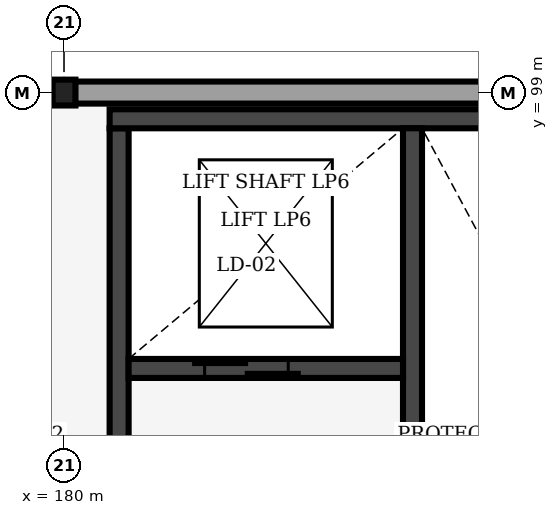
"""IFC4 building model, lengths in metres.
Left out: names, types, materials, properties, quantities, classifications, styles, units other than length and angle.
Written with IfcOpenShell. Run it as: python <this file> out.ifc"""

import sys

from ifc_helpers import new_model, si_unit, direction, frame, frame_2d, origin, origin_2d, place, context, subcontext, project, spatial, rectangle, i_section, extrude, element, fill, save


model = new_model("IFC4")
c1 = context("Model", 3, precision=1e-05, world=origin(), true_north=direction((0.0, 1.0)))
c2 = subcontext(c1, "Body", "Model", "MODEL_VIEW")
j1 = project(units=[si_unit("LENGTHUNIT", "METRE"), si_unit("PLANEANGLEUNIT", "RADIAN")], contexts=[c1])
p1 = place(None, origin())
s1 = spatial("IfcSite", under=j1, at=p1, CompositionType="ELEMENT")
p2 = place(p1, origin())
s2 = spatial("IfcBuilding", under=s1, at=p2, CompositionType="ELEMENT")
p3 = place(p2, frame((0.0, 0.0, 26.8)))
s3 = spatial("IfcBuildingStorey", under=s2, at=p3, CompositionType="ELEMENT", Elevation=26.8)
p4 = place(p3, frame((180.0, 99.0, 0.0), z_axis=(0.0, 0.0, 1.0), x_axis=(1.0, 0.0, 0.0)))
e1 = element("IfcColumn", 1, at=p4, inside=s3, PredefinedType="COLUMN", context=c2, shape_type="SweptSolid", body=[
    extrude(i_section(OverallWidth=0.3, OverallDepth=0.34, WebThickness=0.012, FlangeThickness=0.021, FilletRadius=0.027, at=origin_2d()), origin(), (0.0, 0.0, 1.0), 3.0),
])
p5 = place(p3, frame((180.145, 99.0, 0.0), z_axis=(0.0, 0.0, 1.0), x_axis=(1.0, 0.0, 0.0)))
e2 = element("IfcWall", 2, at=p5, inside=s3, PredefinedType="SOLIDWALL", context=c2, shape_type="SweptSolid", body=[
    extrude(rectangle(XDim=11.71, YDim=0.29, at=frame_2d((5.855, 0.0))), origin(), (0.0, 0.0, 1.0), 1.9),
])
p6 = place(p3, frame((180.725, 90.47, 0.0), z_axis=(0.0, 0.0, 1.0), x_axis=(0.0, 1.0, 0.0)))
e3 = element("IfcWall", 3, at=p6, inside=s3, PredefinedType="SHEAR", context=c2, shape_type="SweptSolid", body=[
    extrude(rectangle(XDim=8.06, YDim=0.25, at=frame_2d((4.03, 0.0))), origin(), (0.0, 0.0, 1.0), 2.64),
])
p7 = place(p6, frame((1.15, 0.0, 0.0)))
e4 = element("IfcOpeningElement", 4, at=p7, cuts=e3, PredefinedType="OPENING", context=c2, shape_type="SweptSolid", body=[
    extrude(rectangle(XDim=1.6, YDim=2.2, at=frame_2d((0.8, 1.1))), frame((0.0, 0.135, 0.0), z_axis=(0.0, -1.0, 0.0), x_axis=(1.0, 0.0, 0.0)), (0.0, 0.0, 1.0), 0.27),
])
p8 = place(p3, frame((180.6, 98.655, 0.0), z_axis=(0.0, 0.0, 1.0), x_axis=(1.0, 0.0, 0.0)))
e5 = element("IfcWall", 5, at=p8, inside=s3, PredefinedType="SHEAR", context=c2, shape_type="SweptSolid", body=[
    extrude(rectangle(XDim=7.8, YDim=0.25, at=frame_2d((3.9, 0.0))), origin(), (0.0, 0.0, 1.0), 2.64),
])
p9 = place(p3, frame((184.585, 90.47, 0.0), z_axis=(0.0, 0.0, 1.0), x_axis=(0.0, 1.0, 0.0)))
e6 = element("IfcWall", 6, at=p9, inside=s3, PredefinedType="SHEAR", context=c2, shape_type="SweptSolid", body=[
    extrude(rectangle(XDim=8.06, YDim=0.25, at=frame_2d((4.03, 0.0))), origin(), (0.0, 0.0, 1.0), 2.64),
])
p10 = place(p9, frame((0.25, 0.0, 0.0)))
e7 = element("IfcOpeningElement", 7, at=p10, cuts=e6, PredefinedType="OPENING", context=c2, shape_type="SweptSolid", body=[
    extrude(rectangle(XDim=1.15, YDim=2.15, at=frame_2d((0.575, 1.075))), frame((0.0, 0.135, 0.0), z_axis=(0.0, -1.0, 0.0), x_axis=(1.0, 0.0, 0.0)), (0.0, 0.0, 1.0), 0.27),
])
p11 = place(p3, frame((180.85, 95.37, 0.0), z_axis=(0.0, 0.0, 1.0), x_axis=(1.0, 0.0, 0.0)))
e8 = element("IfcWall", 8, at=p11, inside=s3, PredefinedType="SHEAR", context=c2, shape_type="SweptSolid", body=[
    extrude(rectangle(XDim=3.61, YDim=0.25, at=frame_2d((1.805, 0.0))), origin(), (0.0, 0.0, 1.0), 2.64),
])
p12 = place(p11, frame((1.0, 0.0, 0.0)))
e9 = element("IfcOpeningElement", 9, at=p12, cuts=e8, PredefinedType="OPENING", context=c2, shape_type="SweptSolid", body=[
    extrude(rectangle(XDim=1.1, YDim=2.1, at=frame_2d((0.55, 1.05))), frame((0.0, 0.135, 0.0), z_axis=(0.0, -1.0, 0.0), x_axis=(1.0, 0.0, 0.0)), (0.0, 0.0, 1.0), 0.27),
])
p13 = place(p12, origin())
e10 = element("IfcDoor", 10, at=p13, inside=s3, OperationType="DOUBLE_DOOR_SLIDING", PredefinedType="DOOR", context=c2, shape_type="SweptSolid", body=[
    extrude(rectangle(XDim=1.1, YDim=2.1, at=frame_2d((0.55, 1.05))), frame((0.0, 0.025, 0.0), z_axis=(0.0, -1.0, 0.0), x_axis=(1.0, 0.0, 0.0)), (0.0, 0.0, 1.0), 0.05),
])
fill(e9, e10)
save(model, sys.argv[1])
